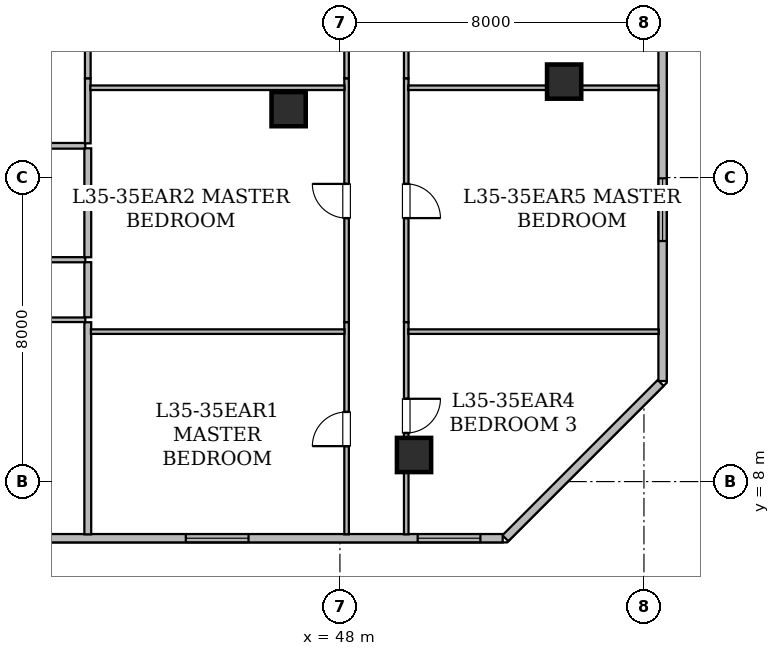
"""IFC4 building model, lengths in metres.
Left out: names, types, materials, properties, quantities, classifications, styles, units other than length and angle.
Written with IfcOpenShell. Run it as: python <this file> out.ifc"""

import sys

from ifc_helpers import new_model, si_unit, direction, frame, frame_2d, origin, origin_2d, place, context, subcontext, project, spatial, rectangle, hollow_rectangle, extrude, element, fill, save


model = new_model("IFC4")
c1 = context("Model", 3, precision=1e-05, world=origin(), true_north=direction((0.0, 1.0)))
c2 = subcontext(c1, "Body", "Model", "MODEL_VIEW")
j1 = project(units=[si_unit("LENGTHUNIT", "METRE"), si_unit("PLANEANGLEUNIT", "RADIAN")], contexts=[c1])
p1 = place(None, origin())
s1 = spatial("IfcSite", under=j1, at=p1, CompositionType="ELEMENT")
p2 = place(p1, origin())
s2 = spatial("IfcBuilding", under=s1, at=p2, CompositionType="ELEMENT")
p3 = place(p2, frame((0.0, 0.0, 138.4)))
s3 = spatial("IfcBuildingStorey", under=s2, at=p3, CompositionType="ELEMENT", Elevation=138.4)
for number, where, z_axis, x_axis in (
    (1, (49.95, 8.7, 0.0), (0.0, 0.0, 1.0), (1.0, 0.0, 0.0)),
    (2, (53.9, 18.525, 0.0), (0.0, 0.0, 1.0), (1.0, 0.0, 0.0)),
    (3, (46.65, 17.8, 0.0), (0.0, 0.0, 1.0), (1.0, 0.0, 0.0)),
):
    element("IfcColumn", number, at=place(p3, frame(where, z_axis=z_axis, x_axis=x_axis)), inside=s3, PredefinedType="COLUMN", context=c2, shape_type="SweptSolid", body=[
        extrude(hollow_rectangle(XDim=0.9, YDim=0.9, WallThickness=0.045, at=origin_2d()), origin(), (0.0, 0.0, 1.0), 3.65),
    ])
p4 = place(p3, frame((56.49, 24.707, 0.0), z_axis=(0.0, 0.0, 1.0), x_axis=(0.0, -1.0, 0.0)))
e4 = element("IfcWall", 4, at=p4, inside=s3, PredefinedType="STANDARD", context=c2, shape_type="SweptSolid", body=[
    extrude(rectangle(XDim=14.061, YDim=0.22, at=frame_2d((7.031, 0.0))), origin(), (0.0, 0.0, 1.0), 3.43),
])
p5 = place(p4, frame((8.727, 0.0, 0.85)))
e5 = element("IfcOpeningElement", 5, at=p5, cuts=e4, PredefinedType="OPENING", context=c2, shape_type="SweptSolid", body=[
    extrude(rectangle(XDim=1.65, YDim=1.55, at=frame_2d((0.825, 0.775))), frame((0.0, 0.12, 0.0), z_axis=(0.0, -1.0, 0.0), x_axis=(1.0, 0.0, 0.0)), (0.0, 0.0, 1.0), 0.24),
])
p6 = place(p4, frame((2.739, 0.0, 0.85)))
e6 = element("IfcOpeningElement", 6, at=p6, cuts=e4, PredefinedType="OPENING", context=c2, shape_type="SweptSolid", body=[
    extrude(rectangle(XDim=1.65, YDim=1.55, at=frame_2d((0.825, 0.775))), frame((0.0, 0.12, 0.0), z_axis=(0.0, -1.0, 0.0), x_axis=(1.0, 0.0, 0.0)), (0.0, 0.0, 1.0), 0.24),
])
p7 = place(p3, frame((56.44, 10.596, 0.0), z_axis=(0.0, 0.0, 1.0), x_axis=(-0.707106781187, -0.707106781187, 0.0)))
e7 = element("IfcWall", 7, at=p7, inside=s3, PredefinedType="STANDARD", context=c2, shape_type="SweptSolid", body=[
    extrude(rectangle(XDim=5.778, YDim=0.22, at=frame_2d((2.889, 0.0))), origin(), (0.0, 0.0, 1.0), 3.43),
])
p8 = place(p3, frame((52.283, 6.51, 0.0), z_axis=(0.0, 0.0, 1.0), x_axis=(-1.0, 0.0, 0.0)))
e8 = element("IfcWall", 8, at=p8, inside=s3, PredefinedType="STANDARD", context=c2, shape_type="SweptSolid", body=[
    extrude(rectangle(XDim=38.568, YDim=0.22, at=frame_2d((19.284, 0.0))), origin(), (0.0, 0.0, 1.0), 3.43),
])
p9 = place(p8, frame((34.581, 0.0, 0.85)))
e9 = element("IfcOpeningElement", 9, at=p9, cuts=e8, PredefinedType="OPENING", context=c2, shape_type="SweptSolid", body=[
    extrude(rectangle(XDim=1.65, YDim=1.55, at=frame_2d((0.825, 0.775))), frame((0.0, 0.12, 0.0), z_axis=(0.0, -1.0, 0.0), x_axis=(1.0, 0.0, 0.0)), (0.0, 0.0, 1.0), 0.24),
])
p10 = place(p8, frame((25.992, 0.0, 0.85)))
e10 = element("IfcOpeningElement", 10, at=p10, cuts=e8, PredefinedType="OPENING", context=c2, shape_type="SweptSolid", body=[
    extrude(rectangle(XDim=1.65, YDim=1.55, at=frame_2d((0.825, 0.775))), frame((0.0, 0.12, 0.0), z_axis=(0.0, -1.0, 0.0), x_axis=(1.0, 0.0, 0.0)), (0.0, 0.0, 1.0), 0.24),
])
p11 = place(p8, frame((28.375, 0.0, 0.8)))
e11 = element("IfcOpeningElement", 11, at=p11, cuts=e8, PredefinedType="OPENING", context=c2, shape_type="SweptSolid", body=[
    extrude(rectangle(XDim=1.2, YDim=1.5, at=frame_2d((0.6, 0.75))), frame((0.0, 0.12, 0.0), z_axis=(0.0, -1.0, 0.0), x_axis=(1.0, 0.0, 0.0)), (0.0, 0.0, 1.0), 0.24),
])
p12 = place(p8, frame((30.784, 0.0, 0.85)))
e12 = element("IfcOpeningElement", 12, at=p12, cuts=e8, PredefinedType="OPENING", context=c2, shape_type="SweptSolid", body=[
    extrude(rectangle(XDim=1.65, YDim=1.55, at=frame_2d((0.825, 0.775))), frame((0.0, 0.12, 0.0), z_axis=(0.0, -1.0, 0.0), x_axis=(1.0, 0.0, 0.0)), (0.0, 0.0, 1.0), 0.24),
])
p13 = place(p8, frame((21.298, 0.0, 0.85)))
e13 = element("IfcOpeningElement", 13, at=p13, cuts=e8, PredefinedType="OPENING", context=c2, shape_type="SweptSolid", body=[
    extrude(rectangle(XDim=1.65, YDim=1.55, at=frame_2d((0.825, 0.775))), frame((0.0, 0.12, 0.0), z_axis=(0.0, -1.0, 0.0), x_axis=(1.0, 0.0, 0.0)), (0.0, 0.0, 1.0), 0.24),
])
p14 = place(p8, frame((14.033, 0.0, 0.85)))
e14 = element("IfcOpeningElement", 14, at=p14, cuts=e8, PredefinedType="OPENING", context=c2, shape_type="SweptSolid", body=[
    extrude(rectangle(XDim=1.65, YDim=1.55, at=frame_2d((0.825, 0.775))), frame((0.0, 0.12, 0.0), z_axis=(0.0, -1.0, 0.0), x_axis=(1.0, 0.0, 0.0)), (0.0, 0.0, 1.0), 0.24),
])
p15 = place(p8, frame((6.688, 0.0, 0.85)))
e15 = element("IfcOpeningElement", 15, at=p15, cuts=e8, PredefinedType="OPENING", context=c2, shape_type="SweptSolid", body=[
    extrude(rectangle(XDim=1.65, YDim=1.55, at=frame_2d((0.825, 0.775))), frame((0.0, 0.12, 0.0), z_axis=(0.0, -1.0, 0.0), x_axis=(1.0, 0.0, 0.0)), (0.0, 0.0, 1.0), 0.24),
])
p16 = place(p8, frame((0.587, 0.0, 0.85)))
e16 = element("IfcOpeningElement", 16, at=p16, cuts=e8, PredefinedType="OPENING", context=c2, shape_type="SweptSolid", body=[
    extrude(rectangle(XDim=1.65, YDim=1.55, at=frame_2d((0.825, 0.775))), frame((0.0, 0.12, 0.0), z_axis=(0.0, -1.0, 0.0), x_axis=(1.0, 0.0, 0.0)), (0.0, 0.0, 1.0), 0.24),
])
p17 = place(p3, frame((41.3, 16.835, 0.0), z_axis=(0.0, 0.0, 1.0), x_axis=(-1.0, 0.0, 0.0)))
e17 = element("IfcWall", 17, at=p17, inside=s3, PredefinedType="STANDARD", context=c2, shape_type="SweptSolid", body=[
    extrude(rectangle(XDim=7.001, YDim=0.15, at=frame_2d((3.5, 0.0))), origin(), (0.0, 0.0, 1.0), 2.647),
])
p18 = place(p3, frame((41.365, 18.612, 0.0), z_axis=(0.0, 0.0, 1.0), x_axis=(0.0, -1.0, 0.0)))
e18 = element("IfcWall", 18, at=p18, inside=s3, PredefinedType="STANDARD", context=c2, shape_type="SweptSolid", body=[
    extrude(rectangle(XDim=1.712, YDim=0.15, at=frame_2d((0.856, 0.0))), origin(), (0.0, 0.0, 1.0), 2.647),
])
p19 = place(p3, frame((41.365, 25.576, 0.0), z_axis=(0.0, 0.0, 1.0), x_axis=(0.0, -1.0, 0.0)))
e19 = element("IfcWall", 19, at=p19, inside=s3, PredefinedType="STANDARD", context=c2, shape_type="SweptSolid", body=[
    extrude(rectangle(XDim=6.964, YDim=0.15, at=frame_2d((3.482, 0.0))), origin(), (0.0, 0.0, 1.0), 2.647),
])
p20 = place(p3, frame((33.985, 13.838, 0.0), z_axis=(0.0, 0.0, 1.0), x_axis=(1.0, 0.0, 0.0)))
e20 = element("IfcWall", 20, at=p20, inside=s3, PredefinedType="PARTITIONING", context=c2, shape_type="SweptSolid", body=[
    extrude(rectangle(XDim=7.315, YDim=0.135, at=frame_2d((3.657, 0.0))), origin(), (0.0, 0.0, 1.0), 2.647),
])
p21 = place(p20, frame((3.233, 0.0, 0.0)))
e21 = element("IfcOpeningElement", 21, at=p21, cuts=e20, PredefinedType="OPENING", context=c2, shape_type="SweptSolid", body=[
    extrude(rectangle(XDim=0.85, YDim=2.1, at=frame_2d((0.425, 1.05))), frame((0.0, 0.077, 0.0), z_axis=(0.0, -1.0, 0.0), x_axis=(1.0, 0.0, 0.0)), (0.0, 0.0, 1.0), 0.155),
])
p22 = place(p3, frame((41.3, 12.258, 0.0), z_axis=(0.0, 0.0, 1.0), x_axis=(-1.0, 0.0, 0.0)))
e22 = element("IfcWall", 22, at=p22, inside=s3, PredefinedType="PARTITIONING", context=c2, shape_type="SweptSolid", body=[
    extrude(rectangle(XDim=7.566, YDim=0.12, at=frame_2d((3.783, 0.0))), origin(), (0.0, 0.0, 1.0), 2.647),
])
p23 = place(p22, frame((3.333, 0.0, 0.0)))
e23 = element("IfcOpeningElement", 23, at=p23, cuts=e22, PredefinedType="OPENING", context=c2, shape_type="SweptSolid", body=[
    extrude(rectangle(XDim=0.9, YDim=2.1, at=frame_2d((0.45, 1.05))), frame((0.0, 0.07, 0.0), z_axis=(0.0, -1.0, 0.0), x_axis=(1.0, 0.0, 0.0)), (0.0, 0.0, 1.0), 0.14),
])
p24 = place(p3, frame((41.365, 13.773, 0.0), z_axis=(0.0, 0.0, 1.0), x_axis=(0.0, -1.0, 0.0)))
e24 = element("IfcWall", 24, at=p24, inside=s3, PredefinedType="STANDARD", context=c2, shape_type="SweptSolid", body=[
    extrude(rectangle(XDim=1.45, YDim=0.18, at=frame_2d((0.725, 0.0))), origin(), (0.0, 0.0, 1.0), 3.43),
])
p25 = place(p3, frame((41.365, 16.77, 0.0), z_axis=(0.0, 0.0, 1.0), x_axis=(0.0, -1.0, 0.0)))
e25 = element("IfcWall", 25, at=p25, inside=s3, PredefinedType="STANDARD", context=c2, shape_type="SweptSolid", body=[
    extrude(rectangle(XDim=2.867, YDim=0.18, at=frame_2d((1.434, 0.0))), origin(), (0.0, 0.0, 1.0), 3.43),
])
p26 = place(p3, frame((41.365, 12.193, 0.0), z_axis=(0.0, 0.0, 1.0), x_axis=(0.0, -1.0, 0.0)))
e26 = element("IfcWall", 26, at=p26, inside=s3, PredefinedType="STANDARD", context=c2, shape_type="SweptSolid", body=[
    extrude(rectangle(XDim=5.581, YDim=0.18, at=frame_2d((2.791, 0.0))), origin(), (0.0, 0.0, 1.0), 2.876),
])
p27 = place(p3, frame((48.175, 6.612, 0.0), z_axis=(0.0, 0.0, 1.0), x_axis=(0.0, 1.0, 0.0)))
e27 = element("IfcWall", 27, at=p27, inside=s3, PredefinedType="PARTITIONING", context=c2, shape_type="SweptSolid", body=[
    extrude(rectangle(XDim=5.584, YDim=0.12, at=frame_2d((2.792, 0.0))), origin(), (0.0, 0.0, 1.0), 2.876),
])
p28 = place(p27, frame((2.321, 0.0, 0.0)))
e28 = element("IfcOpeningElement", 28, at=p28, cuts=e27, PredefinedType="OPENING", context=c2, shape_type="SweptSolid", body=[
    extrude(rectangle(XDim=0.9, YDim=2.1, at=frame_2d((0.45, 1.05))), frame((0.0, 0.07, 0.0), z_axis=(0.0, -1.0, 0.0), x_axis=(1.0, 0.0, 0.0)), (0.0, 0.0, 1.0), 0.14),
])
p29 = place(p3, frame((48.175, 12.196, 0.0), z_axis=(0.0, 0.0, 1.0), x_axis=(0.0, 1.0, 0.0)))
e29 = element("IfcWall", 29, at=p29, inside=s3, PredefinedType="PARTITIONING", context=c2, shape_type="SweptSolid", body=[
    extrude(rectangle(XDim=6.416, YDim=0.12, at=frame_2d((3.208, 0.0))), origin(), (0.0, 0.0, 1.0), 2.647),
])
p30 = place(p29, frame((2.737, 0.0, 0.0)))
e30 = element("IfcOpeningElement", 30, at=p30, cuts=e29, PredefinedType="OPENING", context=c2, shape_type="SweptSolid", body=[
    extrude(rectangle(XDim=0.9, YDim=2.1, at=frame_2d((0.45, 1.05))), frame((0.0, 0.07, 0.0), z_axis=(0.0, -1.0, 0.0), x_axis=(1.0, 0.0, 0.0)), (0.0, 0.0, 1.0), 0.14),
])
p31 = place(p3, frame((48.175, 18.612, 0.0), z_axis=(0.0, 0.0, 1.0), x_axis=(0.0, 1.0, 0.0)))
e31 = element("IfcWall", 31, at=p31, inside=s3, PredefinedType="PARTITIONING", context=c2, shape_type="SweptSolid", body=[
    extrude(rectangle(XDim=7.278, YDim=0.12, at=frame_2d((3.639, 0.0))), origin(), (0.0, 0.0, 1.0), 3.43),
])
p32 = place(p31, frame((3.189, 0.0, 0.0)))
e32 = element("IfcOpeningElement", 32, at=p32, cuts=e31, PredefinedType="OPENING", context=c2, shape_type="SweptSolid", body=[
    extrude(rectangle(XDim=0.9, YDim=2.1, at=frame_2d((0.45, 1.05))), frame((0.0, 0.07, 0.0), z_axis=(0.0, -1.0, 0.0), x_axis=(1.0, 0.0, 0.0)), (0.0, 0.0, 1.0), 0.14),
])
p33 = place(p3, frame((49.745, 12.196, 0.0), z_axis=(0.0, 0.0, 1.0), x_axis=(0.0, -1.0, 0.0)))
e33 = element("IfcWall", 33, at=p33, inside=s3, PredefinedType="PARTITIONING", context=c2, shape_type="SweptSolid", body=[
    extrude(rectangle(XDim=5.584, YDim=0.12, at=frame_2d((2.792, 0.0))), origin(), (0.0, 0.0, 1.0), 2.647),
])
p34 = place(p33, frame((2.017, 0.0, 0.0)))
e34 = element("IfcOpeningElement", 34, at=p34, cuts=e33, PredefinedType="OPENING", context=c2, shape_type="SweptSolid", body=[
    extrude(rectangle(XDim=0.9, YDim=2.1, at=frame_2d((0.45, 1.05))), frame((0.0, 0.07, 0.0), z_axis=(0.0, -1.0, 0.0), x_axis=(1.0, 0.0, 0.0)), (0.0, 0.0, 1.0), 0.14),
])
p35 = place(p3, frame((49.745, 18.612, 0.0), z_axis=(0.0, 0.0, 1.0), x_axis=(0.0, -1.0, 0.0)))
e35 = element("IfcWall", 35, at=p35, inside=s3, PredefinedType="PARTITIONING", context=c2, shape_type="SweptSolid", body=[
    extrude(rectangle(XDim=6.416, YDim=0.12, at=frame_2d((3.208, 0.0))), origin(), (0.0, 0.0, 1.0), 2.647),
])
p36 = place(p35, frame((2.779, 0.0, 0.0)))
e36 = element("IfcOpeningElement", 36, at=p36, cuts=e35, PredefinedType="OPENING", context=c2, shape_type="SweptSolid", body=[
    extrude(rectangle(XDim=0.9, YDim=2.1, at=frame_2d((0.45, 1.05))), frame((0.0, 0.07, 0.0), z_axis=(0.0, -1.0, 0.0), x_axis=(1.0, 0.0, 0.0)), (0.0, 0.0, 1.0), 0.14),
])
p37 = place(p3, frame((49.745, 25.89, 0.0), z_axis=(0.0, 0.0, 1.0), x_axis=(0.0, -1.0, 0.0)))
e37 = element("IfcWall", 37, at=p37, inside=s3, PredefinedType="PARTITIONING", context=c2, shape_type="SweptSolid", body=[
    extrude(rectangle(XDim=7.278, YDim=0.12, at=frame_2d((3.639, 0.0))), origin(), (0.0, 0.0, 1.0), 3.43),
])
p38 = place(p37, frame((3.189, 0.0, 0.0)))
e38 = element("IfcOpeningElement", 38, at=p38, cuts=e37, PredefinedType="OPENING", context=c2, shape_type="SweptSolid", body=[
    extrude(rectangle(XDim=0.9, YDim=2.1, at=frame_2d((0.45, 1.05))), frame((0.0, 0.07, 0.0), z_axis=(0.0, -1.0, 0.0), x_axis=(1.0, 0.0, 0.0)), (0.0, 0.0, 1.0), 0.14),
])
p39 = place(p3, frame((41.447, 11.946, 0.0), z_axis=(0.0, 0.0, 1.0), x_axis=(1.0, 0.0, 0.0)))
e39 = element("IfcWall", 39, at=p39, inside=s3, PredefinedType="PARTITIONING", context=c2, shape_type="SweptSolid", body=[
    extrude(rectangle(XDim=6.674, YDim=0.12, at=frame_2d((3.337, 0.0))), origin(), (0.0, 0.0, 1.0), 3.43),
])
p40 = place(p3, frame((41.432, 18.363, 0.0), z_axis=(0.0, 0.0, 1.0), x_axis=(1.0, 0.0, 0.0)))
e40 = element("IfcWall", 40, at=p40, inside=s3, PredefinedType="PARTITIONING", context=c2, shape_type="SweptSolid", body=[
    extrude(rectangle(XDim=6.689, YDim=0.12, at=frame_2d((3.345, 0.0))), origin(), (0.0, 0.0, 1.0), 2.647),
])
p41 = place(p3, frame((49.799, 11.946, 0.0), z_axis=(0.0, 0.0, 1.0), x_axis=(1.0, 0.0, 0.0)))
e41 = element("IfcWall", 41, at=p41, inside=s3, PredefinedType="PARTITIONING", context=c2, shape_type="SweptSolid", body=[
    extrude(rectangle(XDim=6.589, YDim=0.12, at=frame_2d((3.294, 0.0))), origin(), (0.0, 0.0, 1.0), 2.876),
])
p42 = place(p3, frame((49.799, 18.363, 0.0), z_axis=(0.0, 0.0, 1.0), x_axis=(1.0, 0.0, 0.0)))
e42 = element("IfcWall", 42, at=p42, inside=s3, PredefinedType="PARTITIONING", context=c2, shape_type="SweptSolid", body=[
    extrude(rectangle(XDim=6.589, YDim=0.12, at=frame_2d((3.294, 0.0))), origin(), (0.0, 0.0, 1.0), 2.647),
])
p43 = place(p15, origin())
e43 = element("IfcWindow", 43, at=p43, inside=s3, PartitioningType="SINGLE_PANEL", PredefinedType="WINDOW", context=c2, shape_type="SweptSolid", body=[
    extrude(rectangle(XDim=1.65, YDim=1.55, at=frame_2d((0.825, 0.775))), frame((0.0, 0.03, 0.0), z_axis=(0.0, -1.0, 0.0), x_axis=(1.0, 0.0, 0.0)), (0.0, 0.0, 1.0), 0.06),
])
fill(e15, e43)
p44 = place(p16, origin())
e44 = element("IfcWindow", 44, at=p44, inside=s3, PartitioningType="SINGLE_PANEL", PredefinedType="WINDOW", context=c2, shape_type="SweptSolid", body=[
    extrude(rectangle(XDim=1.65, YDim=1.55, at=frame_2d((0.825, 0.775))), frame((0.0, 0.03, 0.0), z_axis=(0.0, -1.0, 0.0), x_axis=(1.0, 0.0, 0.0)), (0.0, 0.0, 1.0), 0.06),
])
fill(e16, e44)
p45 = place(p5, origin())
e45 = element("IfcWindow", 45, at=p45, inside=s3, PartitioningType="SINGLE_PANEL", PredefinedType="WINDOW", context=c2, shape_type="SweptSolid", body=[
    extrude(rectangle(XDim=1.65, YDim=1.55, at=frame_2d((0.825, 0.775))), frame((0.0, 0.03, 0.0), z_axis=(0.0, -1.0, 0.0), x_axis=(1.0, 0.0, 0.0)), (0.0, 0.0, 1.0), 0.06),
])
fill(e5, e45)
p46 = place(p28, origin())
e46 = element("IfcDoor", 46, at=p46, inside=s3, OperationType="SINGLE_SWING_LEFT", PredefinedType="DOOR", context=c2, shape_type="SweptSolid", body=[
    extrude(rectangle(XDim=0.9, YDim=2.1, at=frame_2d((0.45, 1.05))), frame((0.0, 0.025, 0.0), z_axis=(0.0, -1.0, 0.0), x_axis=(1.0, 0.0, 0.0)), (0.0, 0.0, 1.0), 0.05),
])
fill(e28, e46)
p47 = place(p30, origin())
e47 = element("IfcDoor", 47, at=p47, inside=s3, OperationType="SINGLE_SWING_RIGHT", PredefinedType="DOOR", context=c2, shape_type="SweptSolid", body=[
    extrude(rectangle(XDim=0.9, YDim=2.1, at=frame_2d((0.45, 1.05))), frame((0.0, 0.025, 0.0), z_axis=(0.0, -1.0, 0.0), x_axis=(1.0, 0.0, 0.0)), (0.0, 0.0, 1.0), 0.05),
])
fill(e30, e47)
p48 = place(p34, origin())
e48 = element("IfcDoor", 48, at=p48, inside=s3, OperationType="SINGLE_SWING_LEFT", PredefinedType="DOOR", context=c2, shape_type="SweptSolid", body=[
    extrude(rectangle(XDim=0.9, YDim=2.1, at=frame_2d((0.45, 1.05))), frame((0.0, 0.025, 0.0), z_axis=(0.0, -1.0, 0.0), x_axis=(1.0, 0.0, 0.0)), (0.0, 0.0, 1.0), 0.05),
])
fill(e34, e48)
p49 = place(p36, origin())
e49 = element("IfcDoor", 49, at=p49, inside=s3, OperationType="SINGLE_SWING_RIGHT", PredefinedType="DOOR", context=c2, shape_type="SweptSolid", body=[
    extrude(rectangle(XDim=0.9, YDim=2.1, at=frame_2d((0.45, 1.05))), frame((0.0, 0.025, 0.0), z_axis=(0.0, -1.0, 0.0), x_axis=(1.0, 0.0, 0.0)), (0.0, 0.0, 1.0), 0.05),
])
fill(e36, e49)
save(model, sys.argv[1])
